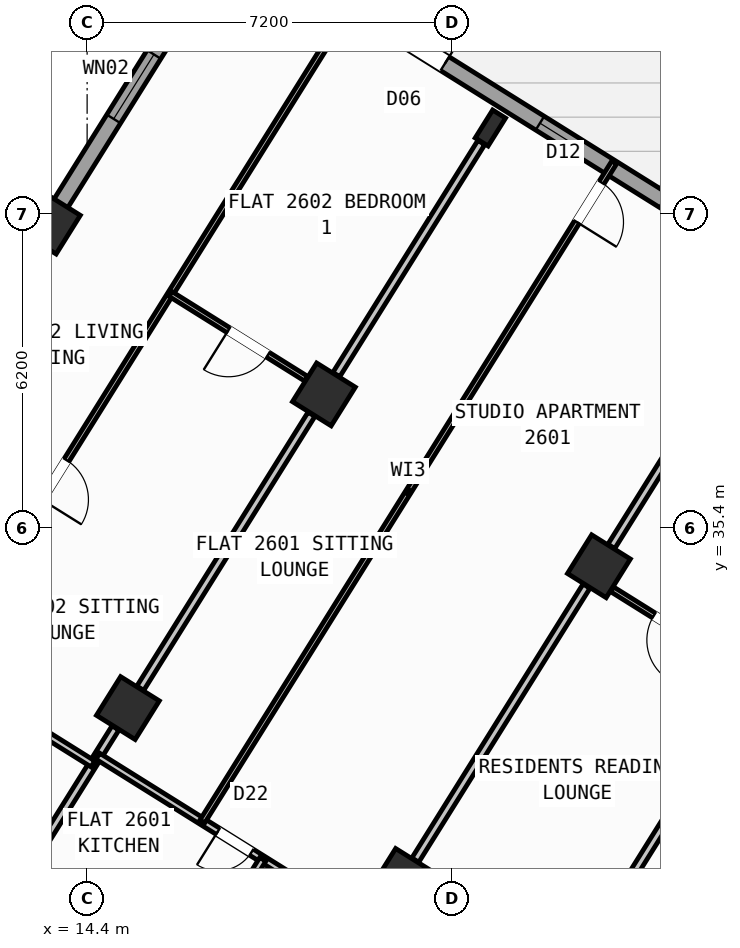
"""IFC4 building model, lengths in metres.
Left out: names, types, materials, properties, quantities, classifications, styles, units other than length and angle.
Written with IfcOpenShell. Run it as: python <this file> out.ifc"""

import sys

from ifc_helpers import new_model, si_unit, direction, frame, frame_2d, origin, origin_2d, place, context, subcontext, project, spatial, rectangle, hollow_rectangle, i_section, extrude, source, transform, mapped, element, fill, save


model = new_model("IFC4")
c1 = context("Model", 3, precision=1e-05, world=origin(), true_north=direction((0.0, 1.0)))
c2 = subcontext(c1, "Body", "Model", "MODEL_VIEW")
j1 = project(units=[si_unit("LENGTHUNIT", "METRE"), si_unit("PLANEANGLEUNIT", "RADIAN")], contexts=[c1])
p1 = place(None, origin())
s1 = spatial("IfcSite", under=j1, at=p1, CompositionType="ELEMENT")
p2 = place(p1, origin())
s2 = spatial("IfcBuilding", under=s1, at=p2, CompositionType="ELEMENT")
p3 = place(p2, frame((0.0, 0.0, 105.3)))
s3 = spatial("IfcBuildingStorey", under=s2, at=p3, CompositionType="ELEMENT", Elevation=105.3)
m1 = source(origin(), c2, "Body", "SweptSolid", [
    extrude(hollow_rectangle(XDim=0.9, YDim=0.9, WallThickness=0.036, at=origin_2d()), origin(), (0.0, 0.0, 1.0), 3.6),
])
for number, where, z_axis, x_axis in (
    (1, (24.5, 34.643, 0.0), (0.0, 0.0, 1.0), (-0.848, 0.53, 0.0)),
    (2, (20.632, 28.452, 0.0), (0.0, 0.0, 1.0), (-0.848, 0.53, 0.0)),
):
    element("IfcColumn", number, at=place(p3, frame(where, z_axis=z_axis, x_axis=x_axis)), inside=s3, PredefinedType="COLUMN", context=c2, shape_type="MappedRepresentation", body=[
        mapped(m1, transform((0.0, 0.0, 0.0), scale=1.0)),
    ])
m2 = source(origin(), c2, "Body", "SweptSolid", [
    extrude(i_section(OverallWidth=0.3, OverallDepth=0.65, WebThickness=0.016, FlangeThickness=0.031, at=origin_2d()), origin(), (0.0, 0.0, 1.0), 3.6),
])
p4 = place(p3, frame((22.358, 43.292, 0.0), z_axis=(0.0, 0.0, 1.0), x_axis=(-0.848048096156, 0.529919264233, 0.0)))
e3 = element("IfcColumn", 3, at=p4, inside=s3, PredefinedType="COLUMN", context=c2, shape_type="MappedRepresentation", body=[
    mapped(m2, transform((0.0, 0.0, 0.0), scale=1.0)),
])
for number, where, z_axis, x_axis in (
    (4, (19.073, 38.034, 0.0), (0.0, 0.0, 1.0), (-0.848, 0.53, 0.0)),
    (5, (15.205, 31.844, 0.0), (0.0, 0.0, 1.0), (-0.848, 0.53, 0.0)),
    (6, (13.646, 41.426, 0.0), (0.0, 0.0, 1.0), (-0.848, 0.53, 0.0)),
):
    element("IfcColumn", number, at=place(p3, frame(where, z_axis=z_axis, x_axis=x_axis)), inside=s3, PredefinedType="COLUMN", context=c2, shape_type="MappedRepresentation", body=[
        mapped(m1, transform((0.0, 0.0, 0.0), scale=1.0)),
    ])
p5 = place(p3, frame((5.7, 28.71, 0.0), z_axis=(0.0, 0.0, 1.0), x_axis=(0.529923711467, 0.8480453172, 0.0)))
e7 = element("IfcWall", 7, at=p5, inside=s3, PredefinedType="STANDARD", context=c2, shape_type="SweptSolid", body=[
    extrude(rectangle(XDim=21.587, YDim=0.32, at=frame_2d((10.794, 0.0))), origin(), (0.0, 0.0, 1.0), 2.775),
])
p6 = place(p5, frame((4.749, 0.0, 1.0)))
e8 = element("IfcOpeningElement", 8, at=p6, cuts=e7, PredefinedType="OPENING", context=c2, shape_type="SweptSolid", body=[
    extrude(rectangle(XDim=0.9, YDim=1.25, at=frame_2d((0.45, 0.625))), frame((0.0, 0.17, 0.0), z_axis=(0.0, -1.0, 0.0), x_axis=(1.0, 0.0, 0.0)), (0.0, 0.0, 1.0), 0.34),
])
p7 = place(p5, frame((10.444, 0.0, 0.85)))
e9 = element("IfcOpeningElement", 9, at=p7, cuts=e7, PredefinedType="OPENING", context=c2, shape_type="SweptSolid", body=[
    extrude(rectangle(XDim=1.8, YDim=1.5, at=frame_2d((0.9, 0.75))), frame((0.0, 0.17, 0.0), z_axis=(0.0, -1.0, 0.0), x_axis=(1.0, 0.0, 0.0)), (0.0, 0.0, 1.0), 0.34),
])
p8 = place(p5, frame((17.406, 0.0, 0.85)))
e10 = element("IfcOpeningElement", 10, at=p8, cuts=e7, PredefinedType="OPENING", context=c2, shape_type="SweptSolid", body=[
    extrude(rectangle(XDim=1.5, YDim=1.5, at=frame_2d((0.75, 0.75))), frame((0.0, 0.17, 0.0), z_axis=(0.0, -1.0, 0.0), x_axis=(1.0, 0.0, 0.0)), (0.0, 0.0, 1.0), 0.34),
])
p9 = place(p3, frame((17.424, 47.083, 0.0), z_axis=(0.0, 0.0, 1.0), x_axis=(0.848049927979, -0.529916332693, 0.0)))
e11 = element("IfcWall", 11, at=p9, inside=s3, PredefinedType="STANDARD", context=c2, shape_type="SweptSolid", body=[
    extrude(rectangle(XDim=29.223, YDim=0.32, at=frame_2d((14.612, 0.0))), origin(), (0.0, 0.0, 1.0), 3.35),
])
p10 = place(p9, frame((3.709, 0.0, 0.0)))
e12 = element("IfcOpeningElement", 12, at=p10, cuts=e11, PredefinedType="OPENING", context=c2, shape_type="SweptSolid", body=[
    extrude(rectangle(XDim=1.05, YDim=2.15, at=frame_2d((0.525, 1.075))), frame((0.0, 0.17, 0.0), z_axis=(0.0, -1.0, 0.0), x_axis=(1.0, 0.0, 0.0)), (0.0, 0.0, 1.0), 0.34),
])
p11 = place(p9, frame((0.659, 0.0, 0.95)))
e13 = element("IfcOpeningElement", 13, at=p11, cuts=e11, PredefinedType="OPENING", context=c2, shape_type="SweptSolid", body=[
    extrude(rectangle(XDim=1.2, YDim=1.4, at=frame_2d((0.6, 0.7))), frame((0.0, 0.17, 0.0), z_axis=(0.0, -1.0, 0.0), x_axis=(1.0, 0.0, 0.0)), (0.0, 0.0, 1.0), 0.34),
])
p12 = place(p9, frame((6.972, 0.0, 1.0)))
e14 = element("IfcOpeningElement", 14, at=p12, cuts=e11, PredefinedType="OPENING", context=c2, shape_type="SweptSolid", body=[
    extrude(rectangle(XDim=0.9, YDim=1.25, at=frame_2d((0.45, 0.625))), frame((0.0, 0.17, 0.0), z_axis=(0.0, -1.0, 0.0), x_axis=(1.0, 0.0, 0.0)), (0.0, 0.0, 1.0), 0.34),
])
p13 = place(p9, frame((9.847, 0.0, 0.85)))
e15 = element("IfcOpeningElement", 15, at=p13, cuts=e11, PredefinedType="OPENING", context=c2, shape_type="SweptSolid", body=[
    extrude(rectangle(XDim=1.5, YDim=1.5, at=frame_2d((0.75, 0.75))), frame((0.0, 0.17, 0.0), z_axis=(0.0, -1.0, 0.0), x_axis=(1.0, 0.0, 0.0)), (0.0, 0.0, 1.0), 0.34),
])
p14 = place(p9, frame((13.889, 0.0, 0.95)))
e16 = element("IfcOpeningElement", 16, at=p14, cuts=e11, PredefinedType="OPENING", context=c2, shape_type="SweptSolid", body=[
    extrude(rectangle(XDim=1.2, YDim=1.4, at=frame_2d((0.6, 0.7))), frame((0.0, 0.17, 0.0), z_axis=(0.0, -1.0, 0.0), x_axis=(1.0, 0.0, 0.0)), (0.0, 0.0, 1.0), 0.34),
])
p15 = place(p9, frame((17.254, 0.0, 1.0)))
e17 = element("IfcOpeningElement", 17, at=p15, cuts=e11, PredefinedType="OPENING", context=c2, shape_type="SweptSolid", body=[
    extrude(rectangle(XDim=0.9, YDim=1.25, at=frame_2d((0.45, 0.625))), frame((0.0, 0.17, 0.0), z_axis=(0.0, -1.0, 0.0), x_axis=(1.0, 0.0, 0.0)), (0.0, 0.0, 1.0), 0.34),
])
p16 = place(p9, frame((20.764, 0.0, 0.8)))
e18 = element("IfcOpeningElement", 18, at=p16, cuts=e11, PredefinedType="OPENING", context=c2, shape_type="SweptSolid", body=[
    extrude(rectangle(XDim=2.1, YDim=1.55, at=frame_2d((1.05, 0.775))), frame((0.0, 0.17, 0.0), z_axis=(0.0, -1.0, 0.0), x_axis=(1.0, 0.0, 0.0)), (0.0, 0.0, 1.0), 0.34),
])
p17 = place(p9, frame((25.403, 0.0, 0.8)))
e19 = element("IfcOpeningElement", 19, at=p17, cuts=e11, PredefinedType="OPENING", context=c2, shape_type="SweptSolid", body=[
    extrude(rectangle(XDim=2.1, YDim=1.55, at=frame_2d((1.05, 0.775))), frame((0.0, 0.17, 0.0), z_axis=(0.0, -1.0, 0.0), x_axis=(1.0, 0.0, 0.0)), (0.0, 0.0, 1.0), 0.34),
])
p18 = place(p3, frame((31.239, 38.274, 0.0), z_axis=(0.0, 0.0, 1.0), x_axis=(-0.529918119251, -0.84804881162, 0.0)))
e20 = element("IfcWall", 20, at=p18, inside=s3, PredefinedType="PARTITIONING", context=c2, shape_type="SweptSolid", body=[
    extrude(rectangle(XDim=17.65, YDim=0.16, at=frame_2d((8.825, 0.0))), origin(), (0.0, 0.0, 1.0), 3.34),
])
p19 = place(p3, frame((21.885, 23.306, 0.0), z_axis=(0.0, 0.0, 1.0), x_axis=(-0.848052408131, 0.529912363569, 0.0)))
e21 = element("IfcWall", 21, at=p19, inside=s3, PredefinedType="PARTITIONING", context=c2, shape_type="SweptSolid", body=[
    extrude(rectangle(XDim=16.73, YDim=0.16, at=frame_2d((8.365, 0.0))), origin(), (0.0, 0.0, 1.0), 3.34),
])
p20 = place(p19, frame((1.395, 0.0, 0.0)))
e22 = element("IfcOpeningElement", 22, at=p20, cuts=e21, PredefinedType="OPENING", context=c2, shape_type="SweptSolid", body=[
    extrude(rectangle(XDim=1.0, YDim=2.1, at=frame_2d((0.5, 1.05))), frame((0.0, 0.09, 0.0), z_axis=(0.0, -1.0, 0.0), x_axis=(1.0, 0.0, 0.0)), (0.0, 0.0, 1.0), 0.18),
])
p21 = place(p19, frame((7.82, 0.0, 0.0)))
e23 = element("IfcOpeningElement", 23, at=p21, cuts=e21, PredefinedType="OPENING", context=c2, shape_type="SweptSolid", body=[
    extrude(rectangle(XDim=1.0, YDim=2.1, at=frame_2d((0.5, 1.05))), frame((0.0, 0.09, 0.0), z_axis=(0.0, -1.0, 0.0), x_axis=(1.0, 0.0, 0.0)), (0.0, 0.0, 1.0), 0.18),
])
p22 = place(p19, frame((14.76, 0.0, 0.0)))
e24 = element("IfcOpeningElement", 24, at=p22, cuts=e21, PredefinedType="OPENING", context=c2, shape_type="SweptSolid", body=[
    extrude(rectangle(XDim=1.0, YDim=2.1, at=frame_2d((0.5, 1.05))), frame((0.0, 0.09, 0.0), z_axis=(0.0, -1.0, 0.0), x_axis=(1.0, 0.0, 0.0)), (0.0, 0.0, 1.0), 0.18),
])
p23 = place(p3, frame((20.719, 21.44, 0.0), z_axis=(0.0, 0.0, 1.0), x_axis=(-0.848048310262, 0.529918921593, 0.0)))
e25 = element("IfcWall", 25, at=p23, inside=s3, PredefinedType="PARTITIONING", context=c2, shape_type="SweptSolid", body=[
    extrude(rectangle(XDim=16.73, YDim=0.16, at=frame_2d((8.365, 0.0))), origin(), (0.0, 0.0, 1.0), 3.34),
])
p24 = place(p23, frame((1.505, 0.0, 0.0)))
e26 = element("IfcOpeningElement", 26, at=p24, cuts=e25, PredefinedType="OPENING", context=c2, shape_type="SweptSolid", body=[
    extrude(rectangle(XDim=1.0, YDim=2.1, at=frame_2d((0.5, 1.05))), frame((0.0, 0.09, 0.0), z_axis=(0.0, -1.0, 0.0), x_axis=(1.0, 0.0, 0.0)), (0.0, 0.0, 1.0), 0.18),
])
p25 = place(p23, frame((6.435, 0.0, 0.0)))
e27 = element("IfcOpeningElement", 27, at=p25, cuts=e25, PredefinedType="OPENING", context=c2, shape_type="SweptSolid", body=[
    extrude(rectangle(XDim=1.0, YDim=2.1, at=frame_2d((0.5, 1.05))), frame((0.0, 0.09, 0.0), z_axis=(0.0, -1.0, 0.0), x_axis=(1.0, 0.0, 0.0)), (0.0, 0.0, 1.0), 0.18),
])
p26 = place(p23, frame((12.784, 0.0, 0.0)))
e28 = element("IfcOpeningElement", 28, at=p26, cuts=e25, PredefinedType="OPENING", context=c2, shape_type="SweptSolid", body=[
    extrude(rectangle(XDim=1.0, YDim=2.1, at=frame_2d((0.5, 1.05))), frame((0.0, 0.09, 0.0), z_axis=(0.0, -1.0, 0.0), x_axis=(1.0, 0.0, 0.0)), (0.0, 0.0, 1.0), 0.18),
])
p27 = place(p3, frame((27.607, 39.615, 0.0), z_axis=(0.0, 0.0, 1.0), x_axis=(-0.529913610495, -0.848051628978, 0.0)))
e29 = element("IfcWall", 29, at=p27, inside=s3, PredefinedType="PARTITIONING", context=c2, shape_type="SweptSolid", body=[
    extrude(rectangle(XDim=5.401, YDim=0.16, at=frame_2d((2.7, 0.0))), origin(), (0.0, 0.0, 1.0), 2.775),
])
p28 = place(p3, frame((24.256, 34.251, 0.0), z_axis=(0.0, 0.0, 1.0), x_axis=(-0.529919772691, -0.848047778437, 0.0)))
e30 = element("IfcWall", 30, at=p28, inside=s3, PredefinedType="PARTITIONING", context=c2, shape_type="SweptSolid", body=[
    extrude(rectangle(XDim=6.376, YDim=0.16, at=frame_2d((3.188, 0.0))), origin(), (0.0, 0.0, 1.0), 2.775),
])
p29 = place(p3, frame((27.583, 32.424, 0.0), z_axis=(0.0, 0.0, 1.0), x_axis=(-0.848031272749, 0.529946186362, 0.0)))
e31 = element("IfcWall", 31, at=p29, inside=s3, PredefinedType="PARTITIONING", context=c2, shape_type="SweptSolid", body=[
    extrude(rectangle(XDim=3.328, YDim=0.11, at=frame_2d((1.664, 0.0))), origin(), (0.0, 0.0, 1.0), 2.775),
])
p30 = place(p29, frame((1.435, 0.0, 0.0)))
e32 = element("IfcOpeningElement", 32, at=p30, cuts=e31, PredefinedType="OPENING", context=c2, shape_type="SweptSolid", body=[
    extrude(rectangle(XDim=0.92, YDim=2.08, at=frame_2d((0.46, 1.04))), frame((0.0, 0.065, 0.0), z_axis=(0.0, -1.0, 0.0), x_axis=(1.0, 0.0, 0.0)), (0.0, 0.0, 1.0), 0.13),
])
p31 = place(p3, frame((22.18, 43.006, 0.0), z_axis=(0.0, 0.0, 1.0), x_axis=(-0.529913610495, -0.848051628978, 0.0)))
e33 = element("IfcWall", 33, at=p31, inside=s3, PredefinedType="PARTITIONING", context=c2, shape_type="SweptSolid", body=[
    extrude(rectangle(XDim=5.401, YDim=0.16, at=frame_2d((2.7, 0.0))), origin(), (0.0, 0.0, 1.0), 2.775),
])
p32 = place(p3, frame((18.828, 37.643, 0.0), z_axis=(0.0, 0.0, 1.0), x_axis=(-0.529930102756, -0.848041323399, 0.0)))
e34 = element("IfcWall", 34, at=p32, inside=s3, PredefinedType="PARTITIONING", context=c2, shape_type="SweptSolid", body=[
    extrude(rectangle(XDim=6.376, YDim=0.16, at=frame_2d((3.188, 0.0))), origin(), (0.0, 0.0, 1.0), 2.775),
])
p33 = place(p3, frame((14.96, 31.452, 0.0), z_axis=(0.0, 0.0, 1.0), x_axis=(-0.529924383291, -0.848044897393, 0.0)))
e35 = element("IfcWall", 35, at=p33, inside=s3, PredefinedType="PARTITIONING", context=c2, shape_type="SweptSolid", body=[
    extrude(rectangle(XDim=3.238, YDim=0.16, at=frame_2d((1.619, 0.0))), origin(), (0.0, 0.0, 1.0), 2.775),
])
p34 = place(p3, frame((20.039, 27.502, 0.0), z_axis=(0.0, 0.0, 1.0), x_axis=(-0.848039019877, 0.529933789039, 0.0)))
e36 = element("IfcWall", 36, at=p34, inside=s3, PredefinedType="PLUMBINGWALL", context=c2, shape_type="SweptSolid", body=[
    extrude(rectangle(XDim=6.4, YDim=0.14, at=frame_2d((3.2, 0.0))), origin(), (0.0, 0.0, 1.0), 3.34),
])
p35 = place(p34, frame((2.824, 0.0, 0.0)))
e37 = element("IfcOpeningElement", 37, at=p35, cuts=e36, PredefinedType="OPENING", context=c2, shape_type="SweptSolid", body=[
    extrude(rectangle(XDim=0.78, YDim=2.05, at=frame_2d((0.39, 1.025))), frame((0.0, 0.08, 0.0), z_axis=(0.0, -1.0, 0.0), x_axis=(1.0, 0.0, 0.0)), (0.0, 0.0, 1.0), 0.16),
])
p36 = place(p3, frame((17.867, 28.859, 0.0), z_axis=(0.0, 0.0, 1.0), x_axis=(-0.529913878929, -0.848051461244, 0.0)))
e38 = element("IfcWall", 38, at=p36, inside=s3, PredefinedType="PLUMBINGWALL", context=c2, shape_type="SweptSolid", body=[
    extrude(rectangle(XDim=2.58, YDim=0.14, at=frame_2d((1.29, 0.0))), origin(), (0.0, 0.0, 1.0), 3.34),
])
p37 = place(p36, frame((0.9, 0.0, 0.0)))
e39 = element("IfcOpeningElement", 39, at=p37, cuts=e38, PredefinedType="OPENING", context=c2, shape_type="SweptSolid", body=[
    extrude(rectangle(XDim=0.78, YDim=2.05, at=frame_2d((0.39, 1.025))), frame((0.0, 0.08, 0.0), z_axis=(0.0, -1.0, 0.0), x_axis=(1.0, 0.0, 0.0)), (0.0, 0.0, 1.0), 0.16),
])
p38 = place(p3, frame((24.802, 42.614, 0.0), z_axis=(0.0, 0.0, 1.0), x_axis=(-0.529928839727, -0.848042112649, 0.0)))
e40 = element("IfcWall", 40, at=p38, inside=s3, PredefinedType="PARTITIONING", context=c2, shape_type="SweptSolid", body=[
    extrude(rectangle(XDim=15.34, YDim=0.11, at=frame_2d((7.67, 0.0))), origin(), (0.0, 0.0, 1.0), 3.34),
])
p39 = place(p38, frame((0.47, 0.0, 0.0)))
e41 = element("IfcOpeningElement", 41, at=p39, cuts=e40, PredefinedType="OPENING", context=c2, shape_type="SweptSolid", body=[
    extrude(rectangle(XDim=0.92, YDim=2.08, at=frame_2d((0.46, 1.04))), frame((0.0, 0.065, 0.0), z_axis=(0.0, -1.0, 0.0), x_axis=(1.0, 0.0, 0.0)), (0.0, 0.0, 1.0), 0.13),
])
p40 = place(p3, frame((19.67, 45.821, 0.0), z_axis=(0.0, 0.0, 1.0), x_axis=(-0.529916887708, -0.848049581169, 0.0)))
e42 = element("IfcWall", 42, at=p40, inside=s3, PredefinedType="PARTITIONING", context=c2, shape_type="SweptSolid", body=[
    extrude(rectangle(XDim=17.92, YDim=0.11, at=frame_2d((8.96, 0.0))), origin(), (0.0, 0.0, 1.0), 3.34),
])
p41 = place(p40, frame((16.28, 0.0, 0.0)))
e43 = element("IfcOpeningElement", 43, at=p41, cuts=e42, PredefinedType="OPENING", context=c2, shape_type="SweptSolid", body=[
    extrude(rectangle(XDim=0.78, YDim=2.05, at=frame_2d((0.39, 1.025))), frame((0.0, 0.065, 0.0), z_axis=(0.0, -1.0, 0.0), x_axis=(1.0, 0.0, 0.0)), (0.0, 0.0, 1.0), 0.13),
])
p42 = place(p40, frame((10.711, 0.0, 0.0)))
e44 = element("IfcOpeningElement", 44, at=p42, cuts=e42, PredefinedType="OPENING", context=c2, shape_type="SweptSolid", body=[
    extrude(rectangle(XDim=0.92, YDim=2.08, at=frame_2d((0.46, 1.04))), frame((0.0, 0.065, 0.0), z_axis=(0.0, -1.0, 0.0), x_axis=(1.0, 0.0, 0.0)), (0.0, 0.0, 1.0), 0.13),
])
p43 = place(p3, frame((14.516, 30.741, 0.0), z_axis=(0.0, 0.0, 1.0), x_axis=(-0.848051346257, 0.52991406295, 0.0)))
e45 = element("IfcWall", 45, at=p43, inside=s3, PredefinedType="PLUMBINGWALL", context=c2, shape_type="SweptSolid", body=[
    extrude(rectangle(XDim=3.62, YDim=0.14, at=frame_2d((1.81, 0.0))), origin(), (0.0, 0.0, 1.0), 3.34),
])
p44 = place(p3, frame((18.722, 38.344, 0.0), z_axis=(0.0, 0.0, 1.0), x_axis=(-0.84807647212, 0.529873850493, 0.0)))
e46 = element("IfcWall", 46, at=p44, inside=s3, PredefinedType="PARTITIONING", context=c2, shape_type="SweptSolid", body=[
    extrude(rectangle(XDim=3.158, YDim=0.11, at=frame_2d((1.579, 0.0))), origin(), (0.0, 0.0, 1.0), 2.775),
])
p45 = place(p44, frame((0.888, 0.0, 0.0)))
e47 = element("IfcOpeningElement", 47, at=p45, cuts=e46, PredefinedType="OPENING", context=c2, shape_type="SweptSolid", body=[
    extrude(rectangle(XDim=0.92, YDim=2.08, at=frame_2d((0.46, 1.04))), frame((0.0, 0.065, 0.0), z_axis=(0.0, -1.0, 0.0), x_axis=(1.0, 0.0, 0.0)), (0.0, 0.0, 1.0), 0.13),
])
m3 = source(origin(), c2, "Body", "SweptSolid", [
    extrude(rectangle(XDim=1.05, YDim=2.15, at=frame_2d((0.525, 1.075))), frame((0.0, 0.025, 0.0), z_axis=(0.0, -1.0, 0.0), x_axis=(1.0, 0.0, 0.0)), (0.0, 0.0, 1.0), 0.05),
])
p46 = place(p10, origin())
e48 = element("IfcDoor", 48, at=p46, inside=s3, OperationType="SINGLE_SWING_RIGHT", PredefinedType="DOOR", context=c2, shape_type="MappedRepresentation", body=[
    mapped(m3, transform((0.0, 0.0, 0.0), scale=1.0)),
])
fill(e12, e48)
m4 = source(origin(), c2, "Body", "SweptSolid", [
    extrude(rectangle(XDim=1.5, YDim=1.5, at=frame_2d((0.75, 0.75))), frame((0.0, 0.03, 0.0), z_axis=(0.0, -1.0, 0.0), x_axis=(1.0, 0.0, 0.0)), (0.0, 0.0, 1.0), 0.06),
])
p47 = place(p8, origin())
e49 = element("IfcWindow", 49, at=p47, inside=s3, PartitioningType="SINGLE_PANEL", PredefinedType="WINDOW", context=c2, shape_type="MappedRepresentation", body=[
    mapped(m4, transform((0.0, 0.0, 0.0), scale=1.0)),
])
fill(e10, e49)
m5 = source(origin(), c2, "Body", "SweptSolid", [
    extrude(rectangle(XDim=0.9, YDim=1.25, at=frame_2d((0.45, 0.625))), frame((0.0, 0.03, 0.0), z_axis=(0.0, -1.0, 0.0), x_axis=(1.0, 0.0, 0.0)), (0.0, 0.0, 1.0), 0.06),
])
p48 = place(p12, origin())
e50 = element("IfcWindow", 50, at=p48, inside=s3, PartitioningType="SINGLE_PANEL", PredefinedType="WINDOW", context=c2, shape_type="MappedRepresentation", body=[
    mapped(m5, transform((0.0, 0.0, 0.0), scale=1.0)),
])
fill(e14, e50)
m6 = source(origin(), c2, "Body", "SweptSolid", [
    extrude(rectangle(XDim=0.92, YDim=2.08, at=frame_2d((0.46, 1.04))), frame((0.0, 0.025, 0.0), z_axis=(0.0, -1.0, 0.0), x_axis=(1.0, 0.0, 0.0)), (0.0, 0.0, 1.0), 0.05),
])
p49 = place(p30, origin())
e51 = element("IfcDoor", 51, at=p49, inside=s3, OperationType="SINGLE_SWING_LEFT", PredefinedType="DOOR", context=c2, shape_type="MappedRepresentation", body=[
    mapped(m6, transform((0.0, 0.0, 0.0), scale=1.0)),
])
fill(e32, e51)
p50 = place(p39, origin())
e52 = element("IfcDoor", 52, at=p50, inside=s3, OperationType="SINGLE_SWING_RIGHT", PredefinedType="DOOR", context=c2, shape_type="MappedRepresentation", body=[
    mapped(m6, transform((0.0, 0.0, 0.0), scale=1.0)),
])
fill(e41, e52)
m7 = source(origin(), c2, "Body", "SweptSolid", [
    extrude(rectangle(XDim=0.78, YDim=2.05, at=frame_2d((0.39, 1.025))), frame((0.0, 0.025, 0.0), z_axis=(0.0, -1.0, 0.0), x_axis=(1.0, 0.0, 0.0)), (0.0, 0.0, 1.0), 0.05),
])
p51 = place(p35, origin())
e53 = element("IfcDoor", 53, at=p51, inside=s3, OperationType="SINGLE_SWING_RIGHT", PredefinedType="DOOR", context=c2, shape_type="MappedRepresentation", body=[
    mapped(m7, transform((0.0, 0.0, 0.0), scale=1.0)),
])
fill(e37, e53)
p52 = place(p42, origin())
e54 = element("IfcDoor", 54, at=p52, inside=s3, OperationType="SINGLE_SWING_RIGHT", PredefinedType="DOOR", context=c2, shape_type="MappedRepresentation", body=[
    mapped(m6, transform((0.0, 0.0, 0.0), scale=1.0)),
])
fill(e44, e54)
p53 = place(p45, origin())
e55 = element("IfcDoor", 55, at=p53, inside=s3, OperationType="SINGLE_SWING_RIGHT", PredefinedType="DOOR", context=c2, shape_type="MappedRepresentation", body=[
    mapped(m6, transform((0.0, 0.0, 0.0), scale=1.0)),
])
fill(e47, e55)
save(model, sys.argv[1])
